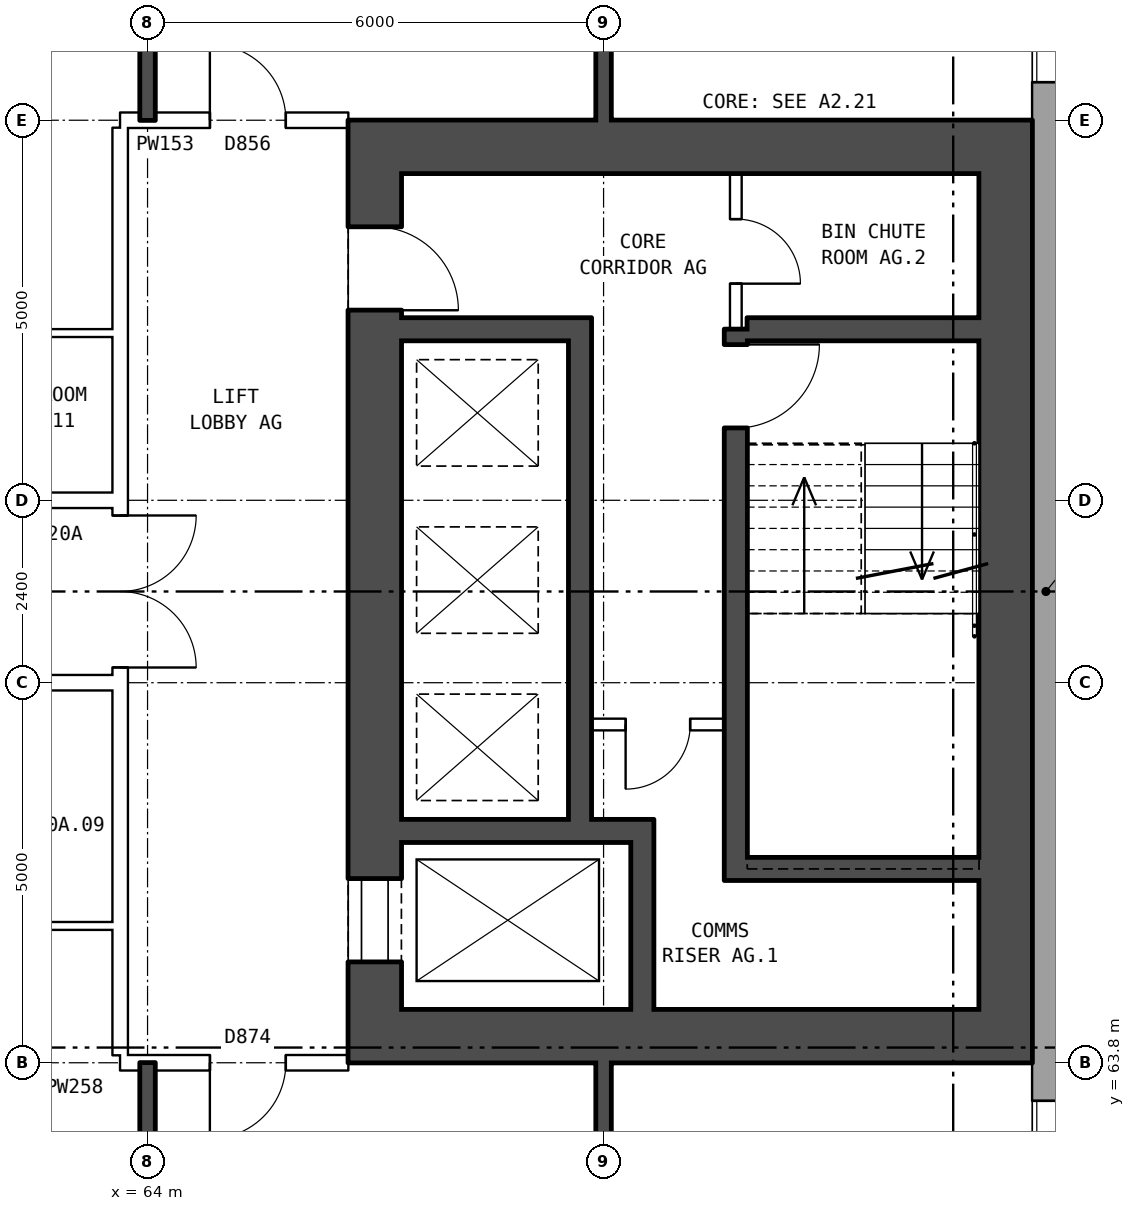
"""IFC4 building model, lengths in metres.
Left out: names, types, materials, properties, quantities, classifications, styles, units other than length and angle.
Written with IfcOpenShell. Run it as: python <this file> out.ifc"""

import sys

from ifc_helpers import new_model, si_unit, direction, frame, frame_2d, origin, place, context, subcontext, project, spatial, rectangle, extrude, element, fill, save


model = new_model("IFC4")
c1 = context("Model", 3, precision=1e-05, world=origin(), true_north=direction((0.0, 1.0)))
c2 = subcontext(c1, "Body", "Model", "MODEL_VIEW")
j1 = project(units=[si_unit("LENGTHUNIT", "METRE"), si_unit("PLANEANGLEUNIT", "RADIAN")], contexts=[c1])
p1 = place(None, origin())
s1 = spatial("IfcSite", under=j1, at=p1, CompositionType="ELEMENT")
p2 = place(p1, origin())
s2 = spatial("IfcBuilding", under=s1, at=p2, CompositionType="ELEMENT")
p3 = place(p2, frame((0.0, 0.0, 74.7)))
s3 = spatial("IfcBuildingStorey", under=s2, at=p3, CompositionType="ELEMENT", Elevation=74.7)
p4 = place(p3, frame((75.82, 57.075, 0.0), z_axis=(0.0, 0.0, 1.0), x_axis=(0.0, 1.0, 0.0)))
e1 = element("IfcWall", 1, at=p4, inside=s3, PredefinedType="STANDARD", context=c2, shape_type="SweptSolid", body=[
    extrude(rectangle(XDim=25.851, YDim=0.36, at=frame_2d((12.925, 0.0))), origin(), (0.0, 0.0, 1.0), 2.85),
])
p5 = place(p4, frame((1.625, 0.0, 0.8)))
e2 = element("IfcOpeningElement", 2, at=p5, cuts=e1, PredefinedType="OPENING", context=c2, shape_type="SweptSolid", body=[
    extrude(rectangle(XDim=1.6, YDim=1.8, at=frame_2d((0.8, 0.9))), frame((0.0, 0.19, 0.0), z_axis=(0.0, -1.0, 0.0), x_axis=(1.0, 0.0, 0.0)), (0.0, 0.0, 1.0), 0.38),
])
p6 = place(p4, frame((4.625, 0.0, 0.8)))
e3 = element("IfcOpeningElement", 3, at=p6, cuts=e1, PredefinedType="OPENING", context=c2, shape_type="SweptSolid", body=[
    extrude(rectangle(XDim=1.6, YDim=1.8, at=frame_2d((0.8, 0.9))), frame((0.0, 0.19, 0.0), z_axis=(0.0, -1.0, 0.0), x_axis=(1.0, 0.0, 0.0)), (0.0, 0.0, 1.0), 0.38),
])
p7 = place(p4, frame((19.625, 0.0, 0.8)))
e4 = element("IfcOpeningElement", 4, at=p7, cuts=e1, PredefinedType="OPENING", context=c2, shape_type="SweptSolid", body=[
    extrude(rectangle(XDim=1.6, YDim=1.8, at=frame_2d((0.8, 0.9))), frame((0.0, 0.19, 0.0), z_axis=(0.0, -1.0, 0.0), x_axis=(1.0, 0.0, 0.0)), (0.0, 0.0, 1.0), 0.38),
])
p8 = place(p4, frame((22.625, 0.0, 0.8)))
e5 = element("IfcOpeningElement", 5, at=p8, cuts=e1, PredefinedType="OPENING", context=c2, shape_type="SweptSolid", body=[
    extrude(rectangle(XDim=1.6, YDim=1.8, at=frame_2d((0.8, 0.9))), frame((0.0, 0.19, 0.0), z_axis=(0.0, -1.0, 0.0), x_axis=(1.0, 0.0, 0.0)), (0.0, 0.0, 1.0), 0.38),
])
p9 = place(p3, frame((66.99, 64.5, 0.0), z_axis=(0.0, 0.0, 1.0), x_axis=(0.0, 1.0, 0.0)))
e6 = element("IfcWall", 6, at=p9, inside=s3, PredefinedType="SHEAR", context=c2, shape_type="SweptSolid", body=[
    extrude(rectangle(XDim=11.0, YDim=0.7, at=frame_2d((5.5, 0.0))), origin(), (0.0, 0.0, 1.0), 2.85),
])
p10 = place(p9, frame((0.625, 0.0, 0.0)))
e7 = element("IfcOpeningElement", 7, at=p10, cuts=e6, PredefinedType="OPENING", context=c2, shape_type="SweptSolid", body=[
    extrude(rectangle(XDim=1.1, YDim=2.1, at=frame_2d((0.55, 1.05))), frame((0.0, 0.36, 0.0), z_axis=(0.0, -1.0, 0.0), x_axis=(1.0, 0.0, 0.0)), (0.0, 0.0, 1.0), 0.72),
])
p11 = place(p9, frame((9.2, 0.0, 0.0)))
e8 = element("IfcOpeningElement", 8, at=p11, cuts=e6, PredefinedType="OPENING", context=c2, shape_type="SweptSolid", body=[
    extrude(rectangle(XDim=1.1, YDim=2.1, at=frame_2d((0.55, 1.05))), frame((0.0, 0.36, 0.0), z_axis=(0.0, -1.0, 0.0), x_axis=(1.0, 0.0, 0.0)), (0.0, 0.0, 1.0), 0.72),
])
p12 = place(p3, frame((75.29, 64.5, 0.0), z_axis=(0.0, 0.0, 1.0), x_axis=(0.0, 1.0, 0.0)))
e9 = element("IfcWall", 9, at=p12, inside=s3, PredefinedType="SHEAR", context=c2, shape_type="SweptSolid", body=[
    extrude(rectangle(XDim=11.0, YDim=0.7, at=frame_2d((5.5, 0.0))), origin(), (0.0, 0.0, 1.0), 2.85),
])
for number, where, z_axis, x_axis in (
    (10, (66.64, 64.15, 0.0), (0.0, 0.0, 1.0), (1.0, 0.0, 0.0)),
    (11, (66.64, 75.85, 0.0), (0.0, 0.0, 1.0), (1.0, 0.0, 0.0)),
):
    element("IfcWall", number, at=place(p3, frame(where, z_axis=z_axis, x_axis=x_axis)), inside=s3, PredefinedType="SHEAR", context=c2, shape_type="SweptSolid", body=[
        extrude(rectangle(XDim=9.0, YDim=0.7, at=frame_2d((4.5, 0.0))), origin(), (0.0, 0.0, 1.0), 2.85),
    ])
p13 = place(p3, frame((71.89, 66.35, 0.0), z_axis=(0.0, 0.0, 1.0), x_axis=(1.0, 0.0, 0.0)))
e12 = element("IfcWall", 12, at=p13, inside=s3, PredefinedType="SHEAR", context=c2, shape_type="SweptSolid", body=[
    extrude(rectangle(XDim=3.05, YDim=0.3, at=frame_2d((1.525, 0.0))), origin(), (0.0, 0.0, 1.0), 2.85),
])
p14 = place(p3, frame((67.34, 66.85, 0.0), z_axis=(0.0, 0.0, 1.0), x_axis=(1.0, 0.0, 0.0)))
e13 = element("IfcWall", 13, at=p14, inside=s3, PredefinedType="SHEAR", context=c2, shape_type="SweptSolid", body=[
    extrude(rectangle(XDim=3.32, YDim=0.3, at=frame_2d((1.66, 0.0))), origin(), (0.0, 0.0, 1.0), 2.85),
])
p15 = place(p3, frame((69.84, 68.25, 0.0), z_axis=(0.0, 0.0, 1.0), x_axis=(1.0, 0.0, 0.0)))
e14 = element("IfcWall", 14, at=p15, inside=s3, PredefinedType="PARTITIONING", context=c2, shape_type="SweptSolid", body=[
    extrude(rectangle(XDim=1.75, YDim=0.15, at=frame_2d((0.875, 0.0))), origin(), (0.0, 0.0, 1.0), 2.85),
])
p16 = place(p15, frame((0.45, 0.0, 0.0)))
e15 = element("IfcOpeningElement", 15, at=p16, cuts=e14, PredefinedType="OPENING", context=c2, shape_type="SweptSolid", body=[
    extrude(rectangle(XDim=0.85, YDim=2.1, at=frame_2d((0.425, 1.05))), frame((0.0, 0.085, 0.0), z_axis=(0.0, -1.0, 0.0), x_axis=(1.0, 0.0, 0.0)), (0.0, 0.0, 1.0), 0.17),
])
p17 = place(p3, frame((67.34, 73.45, 0.0), z_axis=(0.0, 0.0, 1.0), x_axis=(1.0, 0.0, 0.0)))
e16 = element("IfcWall", 16, at=p17, inside=s3, PredefinedType="SHEAR", context=c2, shape_type="SweptSolid", body=[
    extrude(rectangle(XDim=2.2, YDim=0.3, at=frame_2d((1.1, 0.0))), origin(), (0.0, 0.0, 1.0), 2.85),
])
p18 = place(p3, frame((71.89, 73.45, 0.0), z_axis=(0.0, 0.0, 1.0), x_axis=(1.0, 0.0, 0.0)))
e17 = element("IfcWall", 17, at=p18, inside=s3, PredefinedType="SHEAR", context=c2, shape_type="SweptSolid", body=[
    extrude(rectangle(XDim=3.05, YDim=0.3, at=frame_2d((1.525, 0.0))), origin(), (0.0, 0.0, 1.0), 2.85),
])
p19 = place(p3, frame((69.69, 67.0, 0.0), z_axis=(0.0, 0.0, 1.0), x_axis=(0.0, 1.0, 0.0)))
e18 = element("IfcWall", 18, at=p19, inside=s3, PredefinedType="SHEAR", context=c2, shape_type="SweptSolid", body=[
    extrude(rectangle(XDim=6.6, YDim=0.3, at=frame_2d((3.3, 0.0))), origin(), (0.0, 0.0, 1.0), 2.85),
])
p20 = place(p3, frame((70.51, 64.5, 0.0), z_axis=(0.0, 0.0, 1.0), x_axis=(0.0, 1.0, 0.0)))
e19 = element("IfcWall", 19, at=p20, inside=s3, PredefinedType="SHEAR", context=c2, shape_type="SweptSolid", body=[
    extrude(rectangle(XDim=2.2, YDim=0.3, at=frame_2d((1.1, 0.0))), origin(), (0.0, 0.0, 1.0), 2.85),
])
p21 = place(p3, frame((71.74, 66.2, 0.0), z_axis=(0.0, 0.0, 1.0), x_axis=(0.0, 1.0, 0.0)))
e20 = element("IfcWall", 20, at=p21, inside=s3, PredefinedType="SHEAR", context=c2, shape_type="SweptSolid", body=[
    extrude(rectangle(XDim=7.25, YDim=0.3, at=frame_2d((3.625, 0.0))), origin(), (0.0, 0.0, 1.0), 2.85),
])
p22 = place(p21, frame((5.95, 0.0, 0.0)))
e21 = element("IfcOpeningElement", 21, at=p22, cuts=e20, PredefinedType="OPENING", context=c2, shape_type="SweptSolid", body=[
    extrude(rectangle(XDim=1.1, YDim=2.1, at=frame_2d((0.55, 1.05))), frame((0.0, 0.16, 0.0), z_axis=(0.0, -1.0, 0.0), x_axis=(1.0, 0.0, 0.0)), (0.0, 0.0, 1.0), 0.32),
])
p23 = place(p3, frame((71.74, 73.45, 0.0), z_axis=(0.0, 0.0, 1.0), x_axis=(0.0, 1.0, 0.0)))
e22 = element("IfcWall", 22, at=p23, inside=s3, PredefinedType="PARTITIONING", context=c2, shape_type="SweptSolid", body=[
    extrude(rectangle(XDim=2.05, YDim=0.15, at=frame_2d((1.025, 0.0))), origin(), (0.0, 0.0, 1.0), 2.85),
])
p24 = place(p23, frame((0.6, 0.0, 0.0)))
e23 = element("IfcOpeningElement", 23, at=p24, cuts=e22, PredefinedType="OPENING", context=c2, shape_type="SweptSolid", body=[
    extrude(rectangle(XDim=0.85, YDim=2.1, at=frame_2d((0.425, 1.05))), frame((0.0, 0.085, 0.0), z_axis=(0.0, -1.0, 0.0), x_axis=(1.0, 0.0, 0.0)), (0.0, 0.0, 1.0), 0.17),
])
p25 = place(p3, frame((63.64, 63.9, 0.0), z_axis=(0.0, 0.0, 1.0), x_axis=(0.0, 1.0, 0.0)))
e24 = element("IfcWall", 24, at=p25, inside=s3, PredefinedType="PARTITIONING", context=c2, shape_type="SweptSolid", body=[
    extrude(rectangle(XDim=12.2, YDim=0.2, at=frame_2d((6.1, 0.0))), origin(), (0.0, 0.0, 1.0), 2.85),
])
p26 = place(p25, frame((5.1, 0.0, 0.0)))
e25 = element("IfcOpeningElement", 25, at=p26, cuts=e24, PredefinedType="OPENING", context=c2, shape_type="SweptSolid", body=[
    extrude(rectangle(XDim=2.0, YDim=2.1, at=frame_2d((1.0, 1.05))), frame((0.0, 0.11, 0.0), z_axis=(0.0, -1.0, 0.0), x_axis=(1.0, 0.0, 0.0)), (0.0, 0.0, 1.0), 0.22),
])
p27 = place(p3, frame((63.64, 63.8, 0.0), z_axis=(0.0, 0.0, 1.0), x_axis=(1.0, 0.0, 0.0)))
e26 = element("IfcWall", 26, at=p27, inside=s3, PredefinedType="PARTITIONING", context=c2, shape_type="SweptSolid", body=[
    extrude(rectangle(XDim=3.0, YDim=0.2, at=frame_2d((1.5, 0.0))), origin(), (0.0, 0.0, 1.0), 2.85),
])
p28 = place(p27, frame((1.18, 0.0, 0.0)))
e27 = element("IfcOpeningElement", 27, at=p28, cuts=e26, PredefinedType="OPENING", context=c2, shape_type="SweptSolid", body=[
    extrude(rectangle(XDim=1.0, YDim=2.1, at=frame_2d((0.5, 1.05))), frame((0.0, 0.11, 0.0), z_axis=(0.0, -1.0, 0.0), x_axis=(1.0, 0.0, 0.0)), (0.0, 0.0, 1.0), 0.22),
])
p29 = place(p3, frame((61.0, 65.6, 0.0), z_axis=(0.0, 0.0, 1.0), x_axis=(1.0, 0.0, 0.0)))
e28 = element("IfcWall", 28, at=p29, inside=s3, PredefinedType="PARTITIONING", context=c2, shape_type="SweptSolid", body=[
    extrude(rectangle(XDim=2.64, YDim=0.1, at=frame_2d((1.32, 0.0))), origin(), (0.0, 0.0, 1.0), 2.85),
])
p30 = place(p3, frame((44.36, 68.8, 0.0), z_axis=(0.0, 0.0, 1.0), x_axis=(1.0, 0.0, 0.0)))
e29 = element("IfcWall", 29, at=p30, inside=s3, PredefinedType="PARTITIONING", context=c2, shape_type="SweptSolid", body=[
    extrude(rectangle(XDim=19.28, YDim=0.2, at=frame_2d((9.64, 0.0))), origin(), (0.0, 0.0, 1.0), 2.85),
])
p31 = place(p30, frame((14.64, 0.0, 0.0)))
e30 = element("IfcOpeningElement", 30, at=p31, cuts=e29, PredefinedType="OPENING", context=c2, shape_type="SweptSolid", body=[
    extrude(rectangle(XDim=1.0, YDim=2.1, at=frame_2d((0.5, 1.05))), frame((0.0, 0.11, 0.0), z_axis=(0.0, -1.0, 0.0), x_axis=(1.0, 0.0, 0.0)), (0.0, 0.0, 1.0), 0.22),
])
p32 = place(p30, frame((5.64, 0.0, 0.0)))
e31 = element("IfcOpeningElement", 31, at=p32, cuts=e29, PredefinedType="OPENING", context=c2, shape_type="SweptSolid", body=[
    extrude(rectangle(XDim=1.0, YDim=2.1, at=frame_2d((0.5, 1.05))), frame((0.0, 0.11, 0.0), z_axis=(0.0, -1.0, 0.0), x_axis=(1.0, 0.0, 0.0)), (0.0, 0.0, 1.0), 0.22),
])
p33 = place(p3, frame((44.36, 71.2, 0.0), z_axis=(0.0, 0.0, 1.0), x_axis=(1.0, 0.0, 0.0)))
e32 = element("IfcWall", 32, at=p33, inside=s3, PredefinedType="PARTITIONING", context=c2, shape_type="SweptSolid", body=[
    extrude(rectangle(XDim=19.28, YDim=0.2, at=frame_2d((9.64, 0.0))), origin(), (0.0, 0.0, 1.0), 2.85),
])
p34 = place(p33, frame((14.64, 0.0, 0.0)))
e33 = element("IfcOpeningElement", 33, at=p34, cuts=e32, PredefinedType="OPENING", context=c2, shape_type="SweptSolid", body=[
    extrude(rectangle(XDim=1.0, YDim=2.1, at=frame_2d((0.5, 1.05))), frame((0.0, 0.11, 0.0), z_axis=(0.0, -1.0, 0.0), x_axis=(1.0, 0.0, 0.0)), (0.0, 0.0, 1.0), 0.22),
])
p35 = place(p33, frame((5.64, 0.0, 0.0)))
e34 = element("IfcOpeningElement", 34, at=p35, cuts=e32, PredefinedType="OPENING", context=c2, shape_type="SweptSolid", body=[
    extrude(rectangle(XDim=1.0, YDim=2.1, at=frame_2d((0.5, 1.05))), frame((0.0, 0.11, 0.0), z_axis=(0.0, -1.0, 0.0), x_axis=(1.0, 0.0, 0.0)), (0.0, 0.0, 1.0), 0.22),
])
p36 = place(p3, frame((61.0, 73.4, 0.0), z_axis=(0.0, 0.0, 1.0), x_axis=(1.0, 0.0, 0.0)))
e35 = element("IfcWall", 35, at=p36, inside=s3, PredefinedType="PARTITIONING", context=c2, shape_type="SweptSolid", body=[
    extrude(rectangle(XDim=2.64, YDim=0.1, at=frame_2d((1.32, 0.0))), origin(), (0.0, 0.0, 1.0), 2.85),
])
p37 = place(p3, frame((63.64, 76.2, 0.0), z_axis=(0.0, 0.0, 1.0), x_axis=(1.0, 0.0, 0.0)))
e36 = element("IfcWall", 36, at=p37, inside=s3, PredefinedType="PARTITIONING", context=c2, shape_type="SweptSolid", body=[
    extrude(rectangle(XDim=3.0, YDim=0.2, at=frame_2d((1.5, 0.0))), origin(), (0.0, 0.0, 1.0), 2.85),
])
p38 = place(p37, frame((1.18, 0.0, 0.0)))
e37 = element("IfcOpeningElement", 37, at=p38, cuts=e36, PredefinedType="OPENING", context=c2, shape_type="SweptSolid", body=[
    extrude(rectangle(XDim=1.0, YDim=2.1, at=frame_2d((0.5, 1.05))), frame((0.0, 0.11, 0.0), z_axis=(0.0, -1.0, 0.0), x_axis=(1.0, 0.0, 0.0)), (0.0, 0.0, 1.0), 0.22),
])
for number, where, z_axis, x_axis in (
    (38, (64.0, 54.36, 0.0), (0.0, 0.0, 1.0), (0.0, 1.0, 0.0)),
    (39, (64.0, 76.2, 0.0), (0.0, 0.0, 1.0), (0.0, 1.0, 0.0)),
):
    element("IfcWall", number, at=place(p3, frame(where, z_axis=z_axis, x_axis=x_axis)), inside=s3, PredefinedType="SOLIDWALL", context=c2, shape_type="SweptSolid", body=[
        extrude(rectangle(XDim=9.44, YDim=0.2, at=frame_2d((4.72, 0.0))), origin(), (0.0, 0.0, 1.0), 2.85),
    ])
p39 = place(p3, frame((70.0, 54.36, 0.0), z_axis=(0.0, 0.0, 1.0), x_axis=(0.0, 1.0, 0.0)))
e40 = element("IfcWall", 40, at=p39, inside=s3, PredefinedType="SOLIDWALL", context=c2, shape_type="SweptSolid", body=[
    extrude(rectangle(XDim=9.44, YDim=0.2, at=frame_2d((4.72, 0.0))), origin(), (0.0, 0.0, 1.0), 2.85),
])
p40 = place(p39, frame((7.34, 0.0, 0.0)))
e41 = element("IfcOpeningElement", 41, at=p40, cuts=e40, PredefinedType="OPENING", context=c2, shape_type="SweptSolid", body=[
    extrude(rectangle(XDim=0.9, YDim=2.1, at=frame_2d((0.45, 1.05))), frame((0.0, 0.11, 0.0), z_axis=(0.0, -1.0, 0.0), x_axis=(1.0, 0.0, 0.0)), (0.0, 0.0, 1.0), 0.22),
])
p41 = place(p3, frame((70.0, 76.2, 0.0), z_axis=(0.0, 0.0, 1.0), x_axis=(0.0, 1.0, 0.0)))
e42 = element("IfcWall", 42, at=p41, inside=s3, PredefinedType="SOLIDWALL", context=c2, shape_type="SweptSolid", body=[
    extrude(rectangle(XDim=9.44, YDim=0.2, at=frame_2d((4.72, 0.0))), origin(), (0.0, 0.0, 1.0), 2.85),
])
p42 = place(p41, frame((7.17, 0.0, 0.0)))
e43 = element("IfcOpeningElement", 43, at=p42, cuts=e42, PredefinedType="OPENING", context=c2, shape_type="SweptSolid", body=[
    extrude(rectangle(XDim=0.9, YDim=2.1, at=frame_2d((0.45, 1.05))), frame((0.0, 0.11, 0.0), z_axis=(0.0, -1.0, 0.0), x_axis=(1.0, 0.0, 0.0)), (0.0, 0.0, 1.0), 0.22),
])
p43 = place(p41, frame((1.5, 0.0, 0.0)))
e44 = element("IfcOpeningElement", 44, at=p43, cuts=e42, PredefinedType="OPENING", context=c2, shape_type="SweptSolid", body=[
    extrude(rectangle(XDim=0.9, YDim=2.1, at=frame_2d((0.45, 1.05))), frame((0.0, 0.11, 0.0), z_axis=(0.0, -1.0, 0.0), x_axis=(1.0, 0.0, 0.0)), (0.0, 0.0, 1.0), 0.22),
])
p44 = place(p6, origin())
e45 = element("IfcWindow", 45, at=p44, inside=s3, PartitioningType="SINGLE_PANEL", PredefinedType="WINDOW", context=c2, shape_type="SweptSolid", body=[
    extrude(rectangle(XDim=1.6, YDim=1.8, at=frame_2d((0.8, 0.9))), frame((0.0, 0.15, 0.0), z_axis=(0.0, -1.0, 0.0), x_axis=(1.0, 0.0, 0.0)), (0.0, 0.0, 1.0), 0.06),
])
fill(e3, e45)
p45 = place(p7, origin())
e46 = element("IfcWindow", 46, at=p45, inside=s3, PartitioningType="SINGLE_PANEL", PredefinedType="WINDOW", context=c2, shape_type="SweptSolid", body=[
    extrude(rectangle(XDim=1.6, YDim=1.8, at=frame_2d((0.8, 0.9))), frame((0.0, 0.15, 0.0), z_axis=(0.0, -1.0, 0.0), x_axis=(1.0, 0.0, 0.0)), (0.0, 0.0, 1.0), 0.06),
])
fill(e4, e46)
p46 = place(p10, origin())
e47 = element("IfcDoor", 47, at=p46, inside=s3, OperationType="DOUBLE_DOOR_SLIDING", PredefinedType="DOOR", context=c2, shape_type="SweptSolid", body=[
    extrude(rectangle(XDim=1.1, YDim=2.1, at=frame_2d((0.55, 1.05))), frame((0.0, -0.285, 0.0), z_axis=(0.0, -1.0, 0.0), x_axis=(1.0, 0.0, 0.0)), (0.0, 0.0, 1.0), 0.05),
])
fill(e7, e47)
p47 = place(p11, frame((1.1, 0.0, 0.0), z_axis=(0.0, 0.0, 1.0), x_axis=(-1.0, 0.0, 0.0)))
e48 = element("IfcDoor", 48, at=p47, inside=s3, OperationType="SINGLE_SWING_RIGHT", PredefinedType="DOOR", context=c2, shape_type="SweptSolid", body=[
    extrude(rectangle(XDim=1.1, YDim=2.1, at=frame_2d((0.55, 1.05))), frame((0.0, 0.335, 0.0), z_axis=(0.0, -1.0, 0.0), x_axis=(1.0, 0.0, 0.0)), (0.0, 0.0, 1.0), 0.05),
])
fill(e8, e48)
p48 = place(p22, frame((1.1, 0.0, 0.0), z_axis=(0.0, 0.0, 1.0), x_axis=(-1.0, 0.0, 0.0)))
e49 = element("IfcDoor", 49, at=p48, inside=s3, OperationType="SINGLE_SWING_LEFT", PredefinedType="DOOR", context=c2, shape_type="SweptSolid", body=[
    extrude(rectangle(XDim=1.1, YDim=2.1, at=frame_2d((0.55, 1.05))), frame((0.0, 0.025, 0.0), z_axis=(0.0, -1.0, 0.0), x_axis=(1.0, 0.0, 0.0)), (0.0, 0.0, 1.0), 0.05),
])
fill(e21, e49)
p49 = place(p16, frame((0.85, 0.0, 0.0), z_axis=(0.0, 0.0, 1.0), x_axis=(-1.0, 0.0, 0.0)))
e50 = element("IfcDoor", 50, at=p49, inside=s3, OperationType="SINGLE_SWING_RIGHT", PredefinedType="DOOR", context=c2, shape_type="SweptSolid", body=[
    extrude(rectangle(XDim=0.85, YDim=2.1, at=frame_2d((0.425, 1.05))), frame((0.0, 0.025, 0.0), z_axis=(0.0, -1.0, 0.0), x_axis=(1.0, 0.0, 0.0)), (0.0, 0.0, 1.0), 0.05),
])
fill(e15, e50)
p50 = place(p24, frame((0.85, 0.0, 0.0), z_axis=(0.0, 0.0, 1.0), x_axis=(-1.0, 0.0, 0.0)))
e51 = element("IfcDoor", 51, at=p50, inside=s3, OperationType="SINGLE_SWING_RIGHT", PredefinedType="DOOR", context=c2, shape_type="SweptSolid", body=[
    extrude(rectangle(XDim=0.85, YDim=2.1, at=frame_2d((0.425, 1.05))), frame((0.0, 0.025, 0.0), z_axis=(0.0, -1.0, 0.0), x_axis=(1.0, 0.0, 0.0)), (0.0, 0.0, 1.0), 0.05),
])
fill(e23, e51)
p51 = place(p26, frame((2.0, 0.0, 0.0), z_axis=(0.0, 0.0, 1.0), x_axis=(-1.0, 0.0, 0.0)))
e52 = element("IfcDoor", 52, at=p51, inside=s3, OperationType="DOUBLE_DOOR_SINGLE_SWING", PredefinedType="DOOR", context=c2, shape_type="SweptSolid", body=[
    extrude(rectangle(XDim=2.0, YDim=2.1, at=frame_2d((1.0, 1.05))), frame((0.0, 0.025, 0.0), z_axis=(0.0, -1.0, 0.0), x_axis=(1.0, 0.0, 0.0)), (0.0, 0.0, 1.0), 0.05),
])
fill(e25, e52)
p52 = place(p28, frame((1.0, 0.0, 0.0), z_axis=(0.0, 0.0, 1.0), x_axis=(-1.0, 0.0, 0.0)))
e53 = element("IfcDoor", 53, at=p52, inside=s3, OperationType="SINGLE_SWING_RIGHT", PredefinedType="DOOR", context=c2, shape_type="SweptSolid", body=[
    extrude(rectangle(XDim=1.0, YDim=2.1, at=frame_2d((0.5, 1.05))), frame((0.0, 0.025, 0.0), z_axis=(0.0, -1.0, 0.0), x_axis=(1.0, 0.0, 0.0)), (0.0, 0.0, 1.0), 0.05),
])
fill(e27, e53)
p53 = place(p38, origin())
e54 = element("IfcDoor", 54, at=p53, inside=s3, OperationType="SINGLE_SWING_LEFT", PredefinedType="DOOR", context=c2, shape_type="SweptSolid", body=[
    extrude(rectangle(XDim=1.0, YDim=2.1, at=frame_2d((0.5, 1.05))), frame((0.0, 0.025, 0.0), z_axis=(0.0, -1.0, 0.0), x_axis=(1.0, 0.0, 0.0)), (0.0, 0.0, 1.0), 0.05),
])
fill(e37, e54)
save(model, sys.argv[1])
